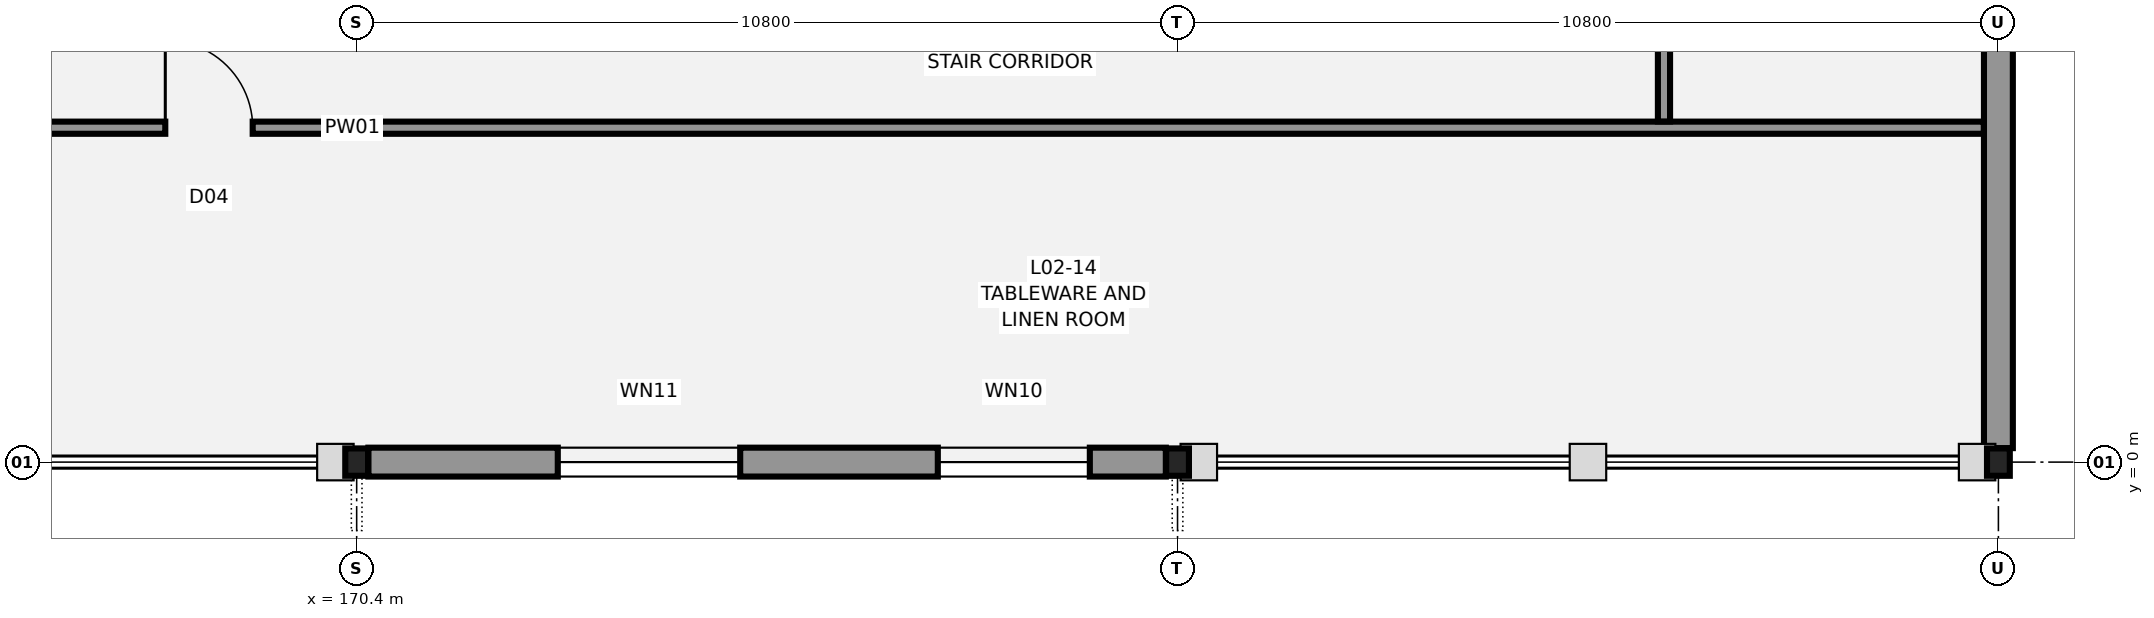
"""IFC4 building model, lengths in metres.
Left out: names, types, materials, properties, quantities, classifications, styles, units other than length and angle.
Written with IfcOpenShell. Run it as: python <this file> out.ifc"""

import sys

from ifc_helpers import new_model, si_unit, direction, frame, frame_2d, origin, origin_2d, place, context, subcontext, project, spatial, rectangle, i_section, extrude, element, fill, save


model = new_model("IFC4")
c1 = context("Model", 3, precision=1e-05, world=origin(), true_north=direction((0.0, 1.0)))
c2 = subcontext(c1, "Body", "Model", "MODEL_VIEW")
j1 = project(units=[si_unit("LENGTHUNIT", "METRE"), si_unit("PLANEANGLEUNIT", "RADIAN")], contexts=[c1])
p1 = place(None, origin())
s1 = spatial("IfcSite", under=j1, at=p1, CompositionType="ELEMENT")
p2 = place(p1, origin())
s2 = spatial("IfcBuilding", under=s1, at=p2, CompositionType="ELEMENT")
p3 = place(p2, frame((0.0, 0.0, 10.2)))
s3 = spatial("IfcBuildingStorey", under=s2, at=p3, CompositionType="ELEMENT", Elevation=10.2)
for number, where, z_axis, x_axis in (
    (1, (170.4, 0.0, 0.0), (0.0, 0.0, 1.0), (1.0, 0.0, 0.0)),
    (2, (181.2, 0.0, 0.0), (0.0, 0.0, 1.0), (1.0, 0.0, 0.0)),
    (3, (192.0, 0.0, 0.0), (0.0, 0.0, 1.0), (1.0, 0.0, 0.0)),
):
    element("IfcColumn", number, at=place(p3, frame(where, z_axis=z_axis, x_axis=x_axis)), inside=s3, PredefinedType="COLUMN", context=c2, shape_type="SweptSolid", body=[
        extrude(i_section(OverallWidth=0.3, OverallDepth=0.36, WebThickness=0.012, FlangeThickness=0.022, FilletRadius=0.027, at=origin_2d()), origin(), (0.0, 0.0, 1.0), 4.2),
    ])
p4 = place(p3, frame((181.046, 0.0, 0.0), z_axis=(0.0, 0.0, 1.0), x_axis=(-1.0, 0.0, 0.0)))
e4 = element("IfcWall", 4, at=p4, inside=s3, PredefinedType="STANDARD", context=c2, shape_type="SweptSolid", body=[
    extrude(rectangle(XDim=10.492, YDim=0.38, at=frame_2d((5.246, 0.0))), origin(), (0.0, 0.0, 1.0), 3.445),
])
p5 = place(p4, frame((1.0, 0.0, 0.8)))
e5 = element("IfcOpeningElement", 5, at=p5, cuts=e4, PredefinedType="OPENING", context=c2, shape_type="SweptSolid", body=[
    extrude(rectangle(XDim=2.0, YDim=2.0, at=frame_2d((1.0, 1.0))), frame((0.0, 0.2, 0.0), z_axis=(0.0, -1.0, 0.0), x_axis=(1.0, 0.0, 0.0)), (0.0, 0.0, 1.0), 0.4),
])
p6 = place(p4, frame((5.6, 0.0, 0.8)))
e6 = element("IfcOpeningElement", 6, at=p6, cuts=e4, PredefinedType="OPENING", context=c2, shape_type="SweptSolid", body=[
    extrude(rectangle(XDim=2.4, YDim=2.1, at=frame_2d((1.2, 1.05))), frame((0.0, 0.2, 0.0), z_axis=(0.0, -1.0, 0.0), x_axis=(1.0, 0.0, 0.0)), (0.0, 0.0, 1.0), 0.4),
])
p7 = place(p3, frame((192.0, 5.816, 0.0), z_axis=(0.0, 0.0, 1.0), x_axis=(0.0, -1.0, 0.0)))
e7 = element("IfcWall", 7, at=p7, inside=s3, PredefinedType="STANDARD", context=c2, shape_type="SweptSolid", body=[
    extrude(rectangle(XDim=5.632, YDim=0.38, at=frame_2d((2.816, 0.0))), origin(), (0.0, 0.0, 1.0), 3.595),
])
p8 = place(p3, frame((148.882, 4.4, 0.0), z_axis=(0.0, 0.0, 1.0), x_axis=(1.0, 0.0, 0.0)))
e8 = element("IfcWall", 8, at=p8, inside=s3, PredefinedType="PARTITIONING", context=c2, shape_type="SweptSolid", body=[
    extrude(rectangle(XDim=42.926, YDim=0.16, at=frame_2d((21.463, 0.0))), origin(), (0.0, 0.0, 1.0), 3.58),
])
p9 = place(p8, frame((19.0, 0.0, 0.0)))
e9 = element("IfcOpeningElement", 9, at=p9, cuts=e8, PredefinedType="OPENING", context=c2, shape_type="SweptSolid", body=[
    extrude(rectangle(XDim=1.15, YDim=2.15, at=frame_2d((0.575, 1.075))), frame((0.0, 0.09, 0.0), z_axis=(0.0, -1.0, 0.0), x_axis=(1.0, 0.0, 0.0)), (0.0, 0.0, 1.0), 0.18),
])
p10 = place(p3, frame((187.6, 4.482, 0.0), z_axis=(0.0, 0.0, 1.0), x_axis=(0.0, 1.0, 0.0)))
e10 = element("IfcWall", 10, at=p10, inside=s3, PredefinedType="PARTITIONING", context=c2, shape_type="SweptSolid", body=[
    extrude(rectangle(XDim=10.918, YDim=0.16, at=frame_2d((5.459, 0.0))), origin(), (0.0, 0.0, 1.0), 3.58),
])
p11 = place(p5, origin())
e11 = element("IfcWindow", 11, at=p11, inside=s3, PartitioningType="SINGLE_PANEL", PredefinedType="WINDOW", context=c2, shape_type="SweptSolid", body=[
    extrude(rectangle(XDim=2.0, YDim=2.0, at=frame_2d((1.0, 1.0))), frame((0.0, 0.03, 0.0), z_axis=(0.0, -1.0, 0.0), x_axis=(1.0, 0.0, 0.0)), (0.0, 0.0, 1.0), 0.06),
])
fill(e5, e11)
p12 = place(p6, origin())
e12 = element("IfcWindow", 12, at=p12, inside=s3, PartitioningType="SINGLE_PANEL", PredefinedType="WINDOW", context=c2, shape_type="SweptSolid", body=[
    extrude(rectangle(XDim=2.4, YDim=2.1, at=frame_2d((1.2, 1.05))), frame((0.0, 0.03, 0.0), z_axis=(0.0, -1.0, 0.0), x_axis=(1.0, 0.0, 0.0)), (0.0, 0.0, 1.0), 0.06),
])
fill(e6, e12)
p13 = place(p9, origin())
e13 = element("IfcDoor", 13, at=p13, inside=s3, OperationType="SINGLE_SWING_LEFT", PredefinedType="DOOR", context=c2, shape_type="SweptSolid", body=[
    extrude(rectangle(XDim=1.15, YDim=2.15, at=frame_2d((0.575, 1.075))), frame((0.0, 0.025, 0.0), z_axis=(0.0, -1.0, 0.0), x_axis=(1.0, 0.0, 0.0)), (0.0, 0.0, 1.0), 0.05),
])
fill(e9, e13)
save(model, sys.argv[1])
